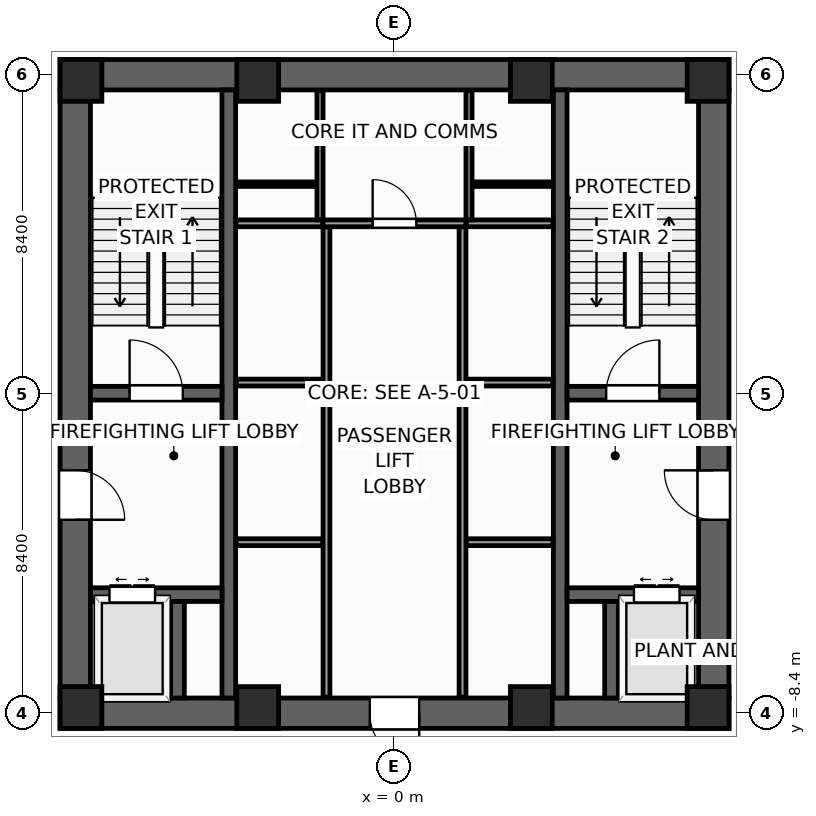
"""IFC4 building model, lengths in metres.
Left out: names, types, materials, properties, quantities, classifications, styles, units other than length and angle.
Written with IfcOpenShell. Run it as: python <this file> out.ifc"""

import sys

from ifc_helpers import new_model, si_unit, direction, frame, frame_2d, origin, origin_2d, place, context, subcontext, project, spatial, rectangle, extrude, source, transform, mapped, element, fill, save


model = new_model("IFC4")
c1 = context("Model", 3, precision=1e-05, world=origin(), true_north=direction((0.0, 1.0)))
c2 = subcontext(c1, "Body", "Model", "MODEL_VIEW")
j1 = project(units=[si_unit("LENGTHUNIT", "METRE"), si_unit("PLANEANGLEUNIT", "RADIAN")], contexts=[c1])
p1 = place(None, origin())
s1 = spatial("IfcSite", under=j1, at=p1, CompositionType="ELEMENT")
p2 = place(p1, origin())
s2 = spatial("IfcBuilding", under=s1, at=p2, CompositionType="ELEMENT")
p3 = place(p2, frame((0.0, 0.0, -9.0)))
s3 = spatial("IfcBuildingStorey", under=s2, at=p3, CompositionType="ELEMENT", Elevation=-9.0)
p4 = place(p3, frame((-8.8, -8.4, 0.0), z_axis=(0.0, 0.0, 1.0), x_axis=(1.0, 0.0, 0.0)))
e1 = element("IfcWall", 1, at=p4, inside=s3, PredefinedType="SHEAR", context=c2, shape_type="SweptSolid", body=[
    extrude(rectangle(XDim=17.6, YDim=0.8, at=frame_2d((8.8, 0.0))), origin(), (0.0, 0.0, 1.0), 4.5),
])
p5 = place(p4, frame((8.15, 0.0, 0.0)))
e2 = element("IfcOpeningElement", 2, at=p5, cuts=e1, PredefinedType="OPENING", context=c2, shape_type="SweptSolid", body=[
    extrude(rectangle(XDim=1.3, YDim=2.2, at=frame_2d((0.65, 1.1))), frame((0.0, 0.41, 0.0), z_axis=(0.0, -1.0, 0.0), x_axis=(1.0, 0.0, 0.0)), (0.0, 0.0, 1.0), 0.82),
])
p6 = place(p3, frame((-8.8, 8.4, 0.0), z_axis=(0.0, 0.0, 1.0), x_axis=(1.0, 0.0, 0.0)))
e3 = element("IfcWall", 3, at=p6, inside=s3, PredefinedType="SHEAR", context=c2, shape_type="SweptSolid", body=[
    extrude(rectangle(XDim=17.6, YDim=0.8, at=frame_2d((8.8, 0.0))), origin(), (0.0, 0.0, 1.0), 4.5),
])
p7 = place(p3, frame((-8.4, -8.0, 0.0), z_axis=(0.0, 0.0, 1.0), x_axis=(0.0, 1.0, 0.0)))
e4 = element("IfcWall", 4, at=p7, inside=s3, PredefinedType="SHEAR", context=c2, shape_type="SweptSolid", body=[
    extrude(rectangle(XDim=16.0, YDim=0.8, at=frame_2d((8.0, 0.0))), origin(), (0.0, 0.0, 1.0), 4.5),
])
p8 = place(p7, frame((4.69, 0.0, 0.0)))
e5 = element("IfcOpeningElement", 5, at=p8, cuts=e4, PredefinedType="OPENING", context=c2, shape_type="SweptSolid", body=[
    extrude(rectangle(XDim=1.3, YDim=2.2, at=frame_2d((0.65, 1.1))), frame((0.0, 0.41, 0.0), z_axis=(0.0, -1.0, 0.0), x_axis=(1.0, 0.0, 0.0)), (0.0, 0.0, 1.0), 0.82),
])
p9 = place(p3, frame((8.4, -8.0, 0.0), z_axis=(0.0, 0.0, 1.0), x_axis=(0.0, 1.0, 0.0)))
e6 = element("IfcWall", 6, at=p9, inside=s3, PredefinedType="SHEAR", context=c2, shape_type="SweptSolid", body=[
    extrude(rectangle(XDim=16.0, YDim=0.8, at=frame_2d((8.0, 0.0))), origin(), (0.0, 0.0, 1.0), 4.5),
])
p10 = place(p9, frame((4.69, 0.0, 0.0)))
e7 = element("IfcOpeningElement", 7, at=p10, cuts=e6, PredefinedType="OPENING", context=c2, shape_type="SweptSolid", body=[
    extrude(rectangle(XDim=1.3, YDim=2.2, at=frame_2d((0.65, 1.1))), frame((0.0, 0.41, 0.0), z_axis=(0.0, -1.0, 0.0), x_axis=(1.0, 0.0, 0.0)), (0.0, 0.0, 1.0), 0.82),
])
for number, where, z_axis, x_axis in (
    (8, (-4.36, -8.0, 0.0), (0.0, 0.0, 1.0), (0.0, 1.0, 0.0)),
    (9, (4.36, -8.0, 0.0), (0.0, 0.0, 1.0), (0.0, 1.0, 0.0)),
):
    element("IfcWall", number, at=place(p3, frame(where, z_axis=z_axis, x_axis=x_axis)), inside=s3, PredefinedType="SHEAR", context=c2, shape_type="SweptSolid", body=[
        extrude(rectangle(XDim=16.0, YDim=0.36, at=frame_2d((8.0, 0.0))), origin(), (0.0, 0.0, 1.0), 4.5),
    ])
p11 = place(p3, frame((-8.0, 0.02, 0.0), z_axis=(0.0, 0.0, 1.0), x_axis=(1.0, 0.0, 0.0)))
e10 = element("IfcWall", 10, at=p11, inside=s3, PredefinedType="SHEAR", context=c2, shape_type="SweptSolid", body=[
    extrude(rectangle(XDim=3.46, YDim=0.36, at=frame_2d((1.73, 0.0))), origin(), (0.0, 0.0, 1.0), 4.5),
])
p12 = place(p11, frame((1.03, 0.0, 0.0)))
e11 = element("IfcOpeningElement", 11, at=p12, cuts=e10, PredefinedType="OPENING", context=c2, shape_type="SweptSolid", body=[
    extrude(rectangle(XDim=1.4, YDim=2.2, at=frame_2d((0.7, 1.1))), frame((0.0, 0.19, 0.0), z_axis=(0.0, -1.0, 0.0), x_axis=(1.0, 0.0, 0.0)), (0.0, 0.0, 1.0), 0.38),
])
p13 = place(p3, frame((4.54, 0.02, 0.0), z_axis=(0.0, 0.0, 1.0), x_axis=(1.0, 0.0, 0.0)))
e12 = element("IfcWall", 12, at=p13, inside=s3, PredefinedType="SHEAR", context=c2, shape_type="SweptSolid", body=[
    extrude(rectangle(XDim=3.46, YDim=0.36, at=frame_2d((1.73, 0.0))), origin(), (0.0, 0.0, 1.0), 4.5),
])
p14 = place(p13, frame((1.03, 0.0, 0.0)))
e13 = element("IfcOpeningElement", 13, at=p14, cuts=e12, PredefinedType="OPENING", context=c2, shape_type="SweptSolid", body=[
    extrude(rectangle(XDim=1.4, YDim=2.2, at=frame_2d((0.7, 1.1))), frame((0.0, 0.19, 0.0), z_axis=(0.0, -1.0, 0.0), x_axis=(1.0, 0.0, 0.0)), (0.0, 0.0, 1.0), 0.38),
])
p15 = place(p3, frame((-8.0, -5.28, 0.0), z_axis=(0.0, 0.0, 1.0), x_axis=(1.0, 0.0, 0.0)))
e14 = element("IfcWall", 14, at=p15, inside=s3, PredefinedType="SHEAR", context=c2, shape_type="SweptSolid", body=[
    extrude(rectangle(XDim=3.46, YDim=0.36, at=frame_2d((1.73, 0.0))), origin(), (0.0, 0.0, 1.0), 4.5),
])
p16 = place(p15, frame((0.5, 0.0, 0.0)))
e15 = element("IfcOpeningElement", 15, at=p16, cuts=e14, PredefinedType="OPENING", context=c2, shape_type="SweptSolid", body=[
    extrude(rectangle(XDim=1.2, YDim=2.25, at=frame_2d((0.6, 1.125))), frame((0.0, 0.19, 0.0), z_axis=(0.0, -1.0, 0.0), x_axis=(1.0, 0.0, 0.0)), (0.0, 0.0, 1.0), 0.38),
])
p17 = place(p3, frame((4.54, -5.28, 0.0), z_axis=(0.0, 0.0, 1.0), x_axis=(1.0, 0.0, 0.0)))
e16 = element("IfcWall", 16, at=p17, inside=s3, PredefinedType="SHEAR", context=c2, shape_type="SweptSolid", body=[
    extrude(rectangle(XDim=3.46, YDim=0.36, at=frame_2d((1.73, 0.0))), origin(), (0.0, 0.0, 1.0), 4.5),
])
p18 = place(p17, frame((1.76, 0.0, 0.0)))
e17 = element("IfcOpeningElement", 17, at=p18, cuts=e16, PredefinedType="OPENING", context=c2, shape_type="SweptSolid", body=[
    extrude(rectangle(XDim=1.2, YDim=2.25, at=frame_2d((0.6, 1.125))), frame((0.0, 0.19, 0.0), z_axis=(0.0, -1.0, 0.0), x_axis=(1.0, 0.0, 0.0)), (0.0, 0.0, 1.0), 0.38),
])
for number, where, z_axis, x_axis in (
    (18, (-5.71, -8.0, 0.0), (0.0, 0.0, 1.0), (0.0, 1.0, 0.0)),
    (19, (5.71, -8.0, 0.0), (0.0, 0.0, 1.0), (0.0, 1.0, 0.0)),
):
    element("IfcWall", number, at=place(p3, frame(where, z_axis=z_axis, x_axis=x_axis)), inside=s3, PredefinedType="SHEAR", context=c2, shape_type="SweptSolid", body=[
        extrude(rectangle(XDim=2.54, YDim=0.36, at=frame_2d((1.27, 0.0))), origin(), (0.0, 0.0, 1.0), 4.5),
    ])
m1 = source(origin(), c2, "Body", "SweptSolid", [
    extrude(rectangle(XDim=1.1, YDim=1.1, at=origin_2d()), origin(), (0.0, 0.0, 1.0), 4.5),
])
for number, where, z_axis, x_axis in (
    (20, (-8.25, -8.25, 0.0), (0.0, 0.0, 1.0), (1.0, 0.0, 0.0)),
    (21, (8.25, -8.25, 0.0), (0.0, 0.0, 1.0), (1.0, 0.0, 0.0)),
    (22, (8.25, 8.25, 0.0), (0.0, 0.0, 1.0), (1.0, 0.0, 0.0)),
    (23, (-8.25, 8.25, 0.0), (0.0, 0.0, 1.0), (1.0, 0.0, 0.0)),
    (24, (-3.6, -8.25, 0.0), (0.0, 0.0, 1.0), (1.0, 0.0, 0.0)),
    (25, (3.6, -8.25, 0.0), (0.0, 0.0, 1.0), (1.0, 0.0, 0.0)),
    (26, (-3.6, 8.25, 0.0), (0.0, 0.0, 1.0), (1.0, 0.0, 0.0)),
    (27, (3.6, 8.25, 0.0), (0.0, 0.0, 1.0), (1.0, 0.0, 0.0)),
):
    element("IfcColumn", number, at=place(p3, frame(where, z_axis=z_axis, x_axis=x_axis)), inside=s3, PredefinedType="PILASTER", context=c2, shape_type="MappedRepresentation", body=[
        mapped(m1, transform((0.0, 0.0, 0.0), scale=1.0)),
    ])
for number, where, z_axis, x_axis in (
    (28, (-1.79, -7.98, 0.0), (0.0, 0.0, 1.0), (0.0, 1.0, 0.0)),
    (29, (1.79, -7.98, 0.0), (0.0, 0.0, 1.0), (0.0, 1.0, 0.0)),
):
    element("IfcWall", number, at=place(p3, frame(where, z_axis=z_axis, x_axis=x_axis)), inside=s3, PredefinedType="PARTITIONING", context=c2, shape_type="SweptSolid", body=[
        extrude(rectangle(XDim=12.38, YDim=0.18, at=frame_2d((6.19, 0.0))), origin(), (0.0, 0.0, 1.0), 4.18),
    ])
p19 = place(p3, frame((-1.88, 4.49, 0.0), z_axis=(0.0, 0.0, 1.0), x_axis=(1.0, 0.0, 0.0)))
e30 = element("IfcWall", 30, at=p19, inside=s3, PredefinedType="PARTITIONING", context=c2, shape_type="SweptSolid", body=[
    extrude(rectangle(XDim=3.76, YDim=0.18, at=frame_2d((1.88, 0.0))), origin(), (0.0, 0.0, 1.0), 4.18),
])
p20 = place(p19, frame((1.305, 0.0, 0.0)))
e31 = element("IfcOpeningElement", 31, at=p20, cuts=e30, PredefinedType="OPENING", context=c2, shape_type="SweptSolid", body=[
    extrude(rectangle(XDim=1.15, YDim=2.25, at=frame_2d((0.575, 1.125))), frame((0.0, 0.1, 0.0), z_axis=(0.0, -1.0, 0.0), x_axis=(1.0, 0.0, 0.0)), (0.0, 0.0, 1.0), 0.2),
])
for number, where, z_axis, x_axis in (
    (32, (-4.17, -3.9, 0.0), (0.0, 0.0, 1.0), (1.0, 0.0, 0.0)),
    (33, (1.89, -3.9, 0.0), (0.0, 0.0, 1.0), (1.0, 0.0, 0.0)),
    (34, (-4.17, 0.3, 0.0), (0.0, 0.0, 1.0), (1.0, 0.0, 0.0)),
    (35, (1.89, 0.3, 0.0), (0.0, 0.0, 1.0), (1.0, 0.0, 0.0)),
    (36, (-4.17, 4.49, 0.0), (0.0, 0.0, 1.0), (1.0, 0.0, 0.0)),
    (37, (1.89, 4.49, 0.0), (0.0, 0.0, 1.0), (1.0, 0.0, 0.0)),
):
    element("IfcWall", number, at=place(p3, frame(where, z_axis=z_axis, x_axis=x_axis)), inside=s3, PredefinedType="PARTITIONING", context=c2, shape_type="SweptSolid", body=[
        extrude(rectangle(XDim=2.28, YDim=0.18, at=frame_2d((1.14, 0.0))), origin(), (0.0, 0.0, 1.0), 4.18),
    ])
for number, where, z_axis, x_axis in (
    (38, (-1.96, 4.58, 0.0), (0.0, 0.0, 1.0), (0.0, 1.0, 0.0)),
    (39, (1.96, 4.58, 0.0), (0.0, 0.0, 1.0), (0.0, 1.0, 0.0)),
):
    element("IfcWall", number, at=place(p3, frame(where, z_axis=z_axis, x_axis=x_axis)), inside=s3, PredefinedType="PARTITIONING", context=c2, shape_type="SweptSolid", body=[
        extrude(rectangle(XDim=3.4, YDim=0.16, at=frame_2d((1.7, 0.0))), origin(), (0.0, 0.0, 1.0), 4.18),
    ])
for number, where, z_axis, x_axis in (
    (40, (-4.16, 5.52, 0.0), (0.0, 0.0, 1.0), (1.0, 0.0, 0.0)),
    (41, (2.06, 5.52, 0.0), (0.0, 0.0, 1.0), (1.0, 0.0, 0.0)),
):
    element("IfcWall", number, at=place(p3, frame(where, z_axis=z_axis, x_axis=x_axis)), inside=s3, PredefinedType="PARTITIONING", context=c2, shape_type="SweptSolid", body=[
        extrude(rectangle(XDim=2.1, YDim=0.12, at=frame_2d((1.05, 0.0))), origin(), (0.0, 0.0, 1.0), 4.18),
    ])
m2 = source(origin(), c2, "Body", "SweptSolid", [
    extrude(rectangle(XDim=1.4, YDim=2.2, at=frame_2d((0.7, 1.1))), frame((0.0, 0.025, 0.0), z_axis=(0.0, -1.0, 0.0), x_axis=(1.0, 0.0, 0.0)), (0.0, 0.0, 1.0), 0.05),
])
p21 = place(p12, origin())
e42 = element("IfcDoor", 42, at=p21, inside=s3, OperationType="SINGLE_SWING_LEFT", PredefinedType="DOOR", context=c2, shape_type="MappedRepresentation", body=[
    mapped(m2, transform((0.0, 0.0, 0.0), scale=1.0)),
])
fill(e11, e42)
p22 = place(p14, origin())
e43 = element("IfcDoor", 43, at=p22, inside=s3, OperationType="SINGLE_SWING_RIGHT", PredefinedType="DOOR", context=c2, shape_type="MappedRepresentation", body=[
    mapped(m2, transform((0.0, 0.0, 0.0), scale=1.0)),
])
fill(e13, e43)
m3 = source(origin(), c2, "Body", "SweptSolid", [
    extrude(rectangle(XDim=1.3, YDim=2.2, at=frame_2d((0.65, 1.1))), frame((0.0, 0.025, 0.0), z_axis=(0.0, -1.0, 0.0), x_axis=(1.0, 0.0, 0.0)), (0.0, 0.0, 1.0), 0.05),
])
p23 = place(p8, frame((1.3, 0.0, 0.0), z_axis=(0.0, 0.0, 1.0), x_axis=(-1.0, 0.0, 0.0)))
e44 = element("IfcDoor", 44, at=p23, inside=s3, OperationType="SINGLE_SWING_LEFT", PredefinedType="DOOR", context=c2, shape_type="MappedRepresentation", body=[
    mapped(m3, transform((0.0, 0.0, 0.0), scale=1.0)),
])
fill(e5, e44)
p24 = place(p10, origin())
e45 = element("IfcDoor", 45, at=p24, inside=s3, OperationType="SINGLE_SWING_RIGHT", PredefinedType="DOOR", context=c2, shape_type="MappedRepresentation", body=[
    mapped(m3, transform((0.0, 0.0, 0.0), scale=1.0)),
])
fill(e7, e45)
p25 = place(p5, frame((1.3, 0.0, 0.0), z_axis=(0.0, 0.0, 1.0), x_axis=(-1.0, 0.0, 0.0)))
e46 = element("IfcDoor", 46, at=p25, inside=s3, OperationType="SINGLE_SWING_RIGHT", PredefinedType="DOOR", context=c2, shape_type="MappedRepresentation", body=[
    mapped(m3, transform((0.0, 0.0, 0.0), scale=1.0)),
])
fill(e2, e46)
m4 = source(origin(), c2, "Body", "SweptSolid", [
    extrude(rectangle(XDim=1.2, YDim=2.25, at=frame_2d((0.6, 1.125))), frame((0.0, 0.025, 0.0), z_axis=(0.0, -1.0, 0.0), x_axis=(1.0, 0.0, 0.0)), (0.0, 0.0, 1.0), 0.05),
])
p26 = place(p16, origin())
e47 = element("IfcDoor", 47, at=p26, inside=s3, OperationType="DOUBLE_DOOR_SLIDING", PredefinedType="DOOR", context=c2, shape_type="MappedRepresentation", body=[
    mapped(m4, transform((0.0, 0.0, 0.0), scale=1.0)),
])
fill(e15, e47)
p27 = place(p18, origin())
e48 = element("IfcDoor", 48, at=p27, inside=s3, OperationType="DOUBLE_DOOR_SLIDING", PredefinedType="DOOR", context=c2, shape_type="MappedRepresentation", body=[
    mapped(m4, transform((0.0, 0.0, 0.0), scale=1.0)),
])
fill(e17, e48)
m5 = source(origin(), c2, "Body", "SweptSolid", [
    extrude(rectangle(XDim=1.15, YDim=2.25, at=frame_2d((0.575, 1.125))), frame((0.0, 0.025, 0.0), z_axis=(0.0, -1.0, 0.0), x_axis=(1.0, 0.0, 0.0)), (0.0, 0.0, 1.0), 0.05),
])
p28 = place(p20, origin())
e49 = element("IfcDoor", 49, at=p28, inside=s3, OperationType="SINGLE_SWING_LEFT", PredefinedType="DOOR", context=c2, shape_type="MappedRepresentation", body=[
    mapped(m5, transform((0.0, 0.0, 0.0), scale=1.0)),
])
fill(e31, e49)
save(model, sys.argv[1])
